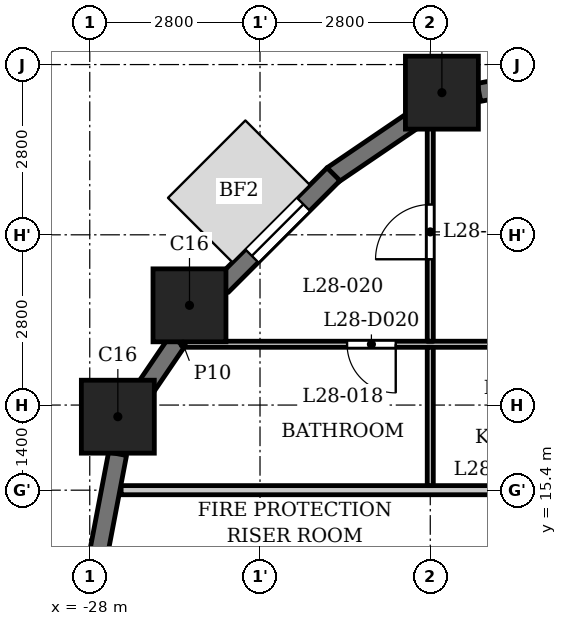
"""IFC4 building model, lengths in metres.
Left out: names, types, materials, properties, quantities, classifications, styles, units other than length and angle.
Written with IfcOpenShell. Run it as: python <this file> out.ifc"""

import sys

from ifc_helpers import new_model, si_unit, direction, frame, frame_2d, origin, origin_2d, place, context, subcontext, project, spatial, rectangle, extrude, element, fill, save


model = new_model("IFC4")
c1 = context("Model", 3, precision=1e-05, world=origin(), true_north=direction((0.0, 1.0)))
c2 = subcontext(c1, "Body", "Model", "MODEL_VIEW")
j1 = project(units=[si_unit("LENGTHUNIT", "METRE"), si_unit("PLANEANGLEUNIT", "RADIAN")], contexts=[c1])
p1 = place(None, origin())
s1 = spatial("IfcSite", under=j1, at=p1, CompositionType="ELEMENT")
p2 = place(p1, origin())
s2 = spatial("IfcBuilding", under=s1, at=p2, CompositionType="ELEMENT")
p3 = place(p2, frame((0.0, 0.0, 111.3)))
s3 = spatial("IfcBuildingStorey", under=s2, at=p3, CompositionType="ELEMENT", Elevation=111.3)
for number, where, z_axis, x_axis in (
    (1, (-22.209, 21.938, 0.0), (0.0, 0.0, 1.0), (1.0, 0.0, 0.0)),
    (2, (-26.36, 18.44, 0.0), (0.0, 0.0, 1.0), (1.0, 0.0, 0.0)),
    (3, (-27.538, 16.609, 0.0), (0.0, 0.0, 1.0), (1.0, 0.0, 0.0)),
):
    element("IfcColumn", number, at=place(p3, frame(where, z_axis=z_axis, x_axis=x_axis)), inside=s3, PredefinedType="COLUMN", context=c2, shape_type="SweptSolid", body=[
        extrude(rectangle(XDim=1.2, YDim=1.2, at=origin_2d()), origin(), (0.0, 0.0, 1.0), 3.5),
    ])
for number, where, z_axis, x_axis in (
    (4, (-19.972, 22.253, 0.0), (0.0, 0.0, 1.0), (-0.982, -0.187, 0.0)),
    (5, (-22.643, 21.51, 0.0), (0.0, 0.0, 1.0), (-0.827, -0.562, 0.0)),
):
    element("IfcWall", number, at=place(p3, frame(where, z_axis=z_axis, x_axis=x_axis)), inside=s3, PredefinedType="SOLIDWALL", context=c2, shape_type="SweptSolid", body=[
        extrude(rectangle(XDim=1.656, YDim=0.3, at=frame_2d((0.828, 0.0))), origin(), (0.0, 0.0, 1.0), 2.4),
    ])
p4 = place(p3, frame((-23.991, 20.597, 0.0), z_axis=(0.0, 0.0, 1.0), x_axis=(-0.707106781187, -0.707106781187, 0.0)))
e6 = element("IfcWall", 6, at=p4, inside=s3, PredefinedType="SOLIDWALL", context=c2, shape_type="SweptSolid", body=[
    extrude(rectangle(XDim=2.6, YDim=0.3, at=frame_2d((1.3, 0.0))), origin(), (0.0, 0.0, 1.0), 2.4),
])
p5 = place(p4, frame((0.7, 0.0, 0.6)))
e7 = element("IfcOpeningElement", 7, at=p5, cuts=e6, PredefinedType="OPENING", context=c2, shape_type="SweptSolid", body=[
    extrude(rectangle(XDim=1.2, YDim=1.55, at=frame_2d((0.6, 0.775))), frame((0.0, 0.16, 0.0), z_axis=(0.0, -1.0, 0.0), x_axis=(1.0, 0.0, 0.0)), (0.0, 0.0, 1.0), 0.32),
])
p6 = place(p3, frame((-26.561, 17.851, 0.0), z_axis=(0.0, 0.0, 1.0), x_axis=(-0.562173331661, -0.827019434577, 0.0)))
e8 = element("IfcWall", 8, at=p6, inside=s3, PredefinedType="SOLIDWALL", context=c2, shape_type="SweptSolid", body=[
    extrude(rectangle(XDim=0.977, YDim=0.3, at=frame_2d((0.489, 0.0))), origin(), (0.0, 0.0, 1.0), 3.2),
])
p7 = place(p3, frame((-27.542, 15.999, 0.0), z_axis=(0.0, 0.0, 1.0), x_axis=(-0.187349172861, -0.982293381546, 0.0)))
e9 = element("IfcWall", 9, at=p7, inside=s3, PredefinedType="SOLIDWALL", context=c2, shape_type="SweptSolid", body=[
    extrude(rectangle(XDim=1.656, YDim=0.3, at=frame_2d((0.828, 0.0))), origin(), (0.0, 0.0, 1.0), 2.4),
])
p8 = place(p3, frame((-27.484, 15.4, 0.0), z_axis=(0.0, 0.0, 1.0), x_axis=(1.0, 0.0, 0.0)))
e10 = element("IfcWall", 10, at=p8, inside=s3, PredefinedType="PARTITIONING", context=c2, shape_type="SweptSolid", body=[
    extrude(rectangle(XDim=54.968, YDim=0.15, at=frame_2d((27.484, 0.0))), origin(), (0.0, 0.0, 1.0), 3.2),
])
p9 = place(p8, frame((9.034, 0.0, 0.0)))
e11 = element("IfcOpeningElement", 11, at=p9, cuts=e10, PredefinedType="OPENING", context=c2, shape_type="SweptSolid", body=[
    extrude(rectangle(XDim=1.0, YDim=2.1, at=frame_2d((0.5, 1.05))), frame((0.0, 0.085, 0.0), z_axis=(0.0, -1.0, 0.0), x_axis=(1.0, 0.0, 0.0)), (0.0, 0.0, 1.0), 0.17),
])
p10 = place(p8, frame((14.634, 0.0, 0.0)))
e12 = element("IfcOpeningElement", 12, at=p10, cuts=e10, PredefinedType="OPENING", context=c2, shape_type="SweptSolid", body=[
    extrude(rectangle(XDim=1.0, YDim=2.1, at=frame_2d((0.5, 1.05))), frame((0.0, 0.085, 0.0), z_axis=(0.0, -1.0, 0.0), x_axis=(1.0, 0.0, 0.0)), (0.0, 0.0, 1.0), 0.17),
])
p11 = place(p8, frame((16.984, 0.0, 0.0)))
e13 = element("IfcOpeningElement", 13, at=p11, cuts=e10, PredefinedType="OPENING", context=c2, shape_type="SweptSolid", body=[
    extrude(rectangle(XDim=1.0, YDim=2.1, at=frame_2d((0.5, 1.05))), frame((0.0, 0.085, 0.0), z_axis=(0.0, -1.0, 0.0), x_axis=(1.0, 0.0, 0.0)), (0.0, 0.0, 1.0), 0.17),
])
p12 = place(p8, frame((28.084, 0.0, 0.0)))
e14 = element("IfcOpeningElement", 14, at=p12, cuts=e10, PredefinedType="OPENING", context=c2, shape_type="SweptSolid", body=[
    extrude(rectangle(XDim=1.0, YDim=2.1, at=frame_2d((0.5, 1.05))), frame((0.0, 0.085, 0.0), z_axis=(0.0, -1.0, 0.0), x_axis=(1.0, 0.0, 0.0)), (0.0, 0.0, 1.0), 0.17),
])
p13 = place(p8, frame((34.834, 0.0, 0.0)))
e15 = element("IfcOpeningElement", 15, at=p13, cuts=e10, PredefinedType="OPENING", context=c2, shape_type="SweptSolid", body=[
    extrude(rectangle(XDim=1.0, YDim=2.1, at=frame_2d((0.5, 1.05))), frame((0.0, 0.085, 0.0), z_axis=(0.0, -1.0, 0.0), x_axis=(1.0, 0.0, 0.0)), (0.0, 0.0, 1.0), 0.17),
])
p14 = place(p8, frame((41.884, 0.0, 0.0)))
e16 = element("IfcOpeningElement", 16, at=p14, cuts=e10, PredefinedType="OPENING", context=c2, shape_type="SweptSolid", body=[
    extrude(rectangle(XDim=1.0, YDim=2.1, at=frame_2d((0.5, 1.05))), frame((0.0, 0.085, 0.0), z_axis=(0.0, -1.0, 0.0), x_axis=(1.0, 0.0, 0.0)), (0.0, 0.0, 1.0), 0.17),
])
p15 = place(p8, frame((48.234, 0.0, 0.0)))
e17 = element("IfcOpeningElement", 17, at=p15, cuts=e10, PredefinedType="OPENING", context=c2, shape_type="SweptSolid", body=[
    extrude(rectangle(XDim=1.0, YDim=2.1, at=frame_2d((0.5, 1.05))), frame((0.0, 0.085, 0.0), z_axis=(0.0, -1.0, 0.0), x_axis=(1.0, 0.0, 0.0)), (0.0, 0.0, 1.0), 0.17),
])
p16 = place(p3, frame((-26.465, 17.8, 0.0), z_axis=(0.0, 0.0, 1.0), x_axis=(1.0, 0.0, 0.0)))
e18 = element("IfcWall", 18, at=p16, inside=s3, PredefinedType="PARTITIONING", context=c2, shape_type="SweptSolid", body=[
    extrude(rectangle(XDim=52.859, YDim=0.1, at=frame_2d((26.43, 0.0))), origin(), (0.0, 0.0, 1.0), 3.2),
])
p17 = place(p16, frame((2.697, 0.0, 0.0)))
e19 = element("IfcOpeningElement", 19, at=p17, cuts=e18, PredefinedType="OPENING", context=c2, shape_type="SweptSolid", body=[
    extrude(rectangle(XDim=0.8, YDim=2.1, at=frame_2d((0.4, 1.05))), frame((0.0, 0.06, 0.0), z_axis=(0.0, -1.0, 0.0), x_axis=(1.0, 0.0, 0.0)), (0.0, 0.0, 1.0), 0.12),
])
p18 = place(p16, frame((7.115, 0.0, 0.0)))
e20 = element("IfcOpeningElement", 20, at=p18, cuts=e18, PredefinedType="OPENING", context=c2, shape_type="SweptSolid", body=[
    extrude(rectangle(XDim=0.9, YDim=2.1, at=frame_2d((0.45, 1.05))), frame((0.0, 0.06, 0.0), z_axis=(0.0, -1.0, 0.0), x_axis=(1.0, 0.0, 0.0)), (0.0, 0.0, 1.0), 0.12),
])
p19 = place(p16, frame((10.315, 0.0, 0.0)))
e21 = element("IfcOpeningElement", 21, at=p19, cuts=e18, PredefinedType="OPENING", context=c2, shape_type="SweptSolid", body=[
    extrude(rectangle(XDim=0.8, YDim=2.1, at=frame_2d((0.4, 1.05))), frame((0.0, 0.06, 0.0), z_axis=(0.0, -1.0, 0.0), x_axis=(1.0, 0.0, 0.0)), (0.0, 0.0, 1.0), 0.12),
])
p20 = place(p16, frame((12.715, 0.0, 0.0)))
e22 = element("IfcOpeningElement", 22, at=p20, cuts=e18, PredefinedType="OPENING", context=c2, shape_type="SweptSolid", body=[
    extrude(rectangle(XDim=0.9, YDim=2.1, at=frame_2d((0.45, 1.05))), frame((0.0, 0.06, 0.0), z_axis=(0.0, -1.0, 0.0), x_axis=(1.0, 0.0, 0.0)), (0.0, 0.0, 1.0), 0.12),
])
p21 = place(p16, frame((21.515, 0.0, 0.0)))
e23 = element("IfcOpeningElement", 23, at=p21, cuts=e18, PredefinedType="OPENING", context=c2, shape_type="SweptSolid", body=[
    extrude(rectangle(XDim=0.8, YDim=2.1, at=frame_2d((0.4, 1.05))), frame((0.0, 0.06, 0.0), z_axis=(0.0, -1.0, 0.0), x_axis=(1.0, 0.0, 0.0)), (0.0, 0.0, 1.0), 0.12),
])
p22 = place(p16, frame((17.065, 0.0, 0.0)))
e24 = element("IfcOpeningElement", 24, at=p22, cuts=e18, PredefinedType="OPENING", context=c2, shape_type="SweptSolid", body=[
    extrude(rectangle(XDim=0.9, YDim=2.1, at=frame_2d((0.45, 1.05))), frame((0.0, 0.06, 0.0), z_axis=(0.0, -1.0, 0.0), x_axis=(1.0, 0.0, 0.0)), (0.0, 0.0, 1.0), 0.12),
])
p23 = place(p16, frame((30.365, 0.0, 0.0)))
e25 = element("IfcOpeningElement", 25, at=p23, cuts=e18, PredefinedType="OPENING", context=c2, shape_type="SweptSolid", body=[
    extrude(rectangle(XDim=0.8, YDim=2.1, at=frame_2d((0.4, 1.05))), frame((0.0, 0.06, 0.0), z_axis=(0.0, -1.0, 0.0), x_axis=(1.0, 0.0, 0.0)), (0.0, 0.0, 1.0), 0.12),
])
p24 = place(p16, frame((28.165, 0.0, 0.0)))
e26 = element("IfcOpeningElement", 26, at=p24, cuts=e18, PredefinedType="OPENING", context=c2, shape_type="SweptSolid", body=[
    extrude(rectangle(XDim=0.9, YDim=2.1, at=frame_2d((0.45, 1.05))), frame((0.0, 0.06, 0.0), z_axis=(0.0, -1.0, 0.0), x_axis=(1.0, 0.0, 0.0)), (0.0, 0.0, 1.0), 0.12),
])
p25 = place(p16, frame((36.115, 0.0, 0.0)))
e27 = element("IfcOpeningElement", 27, at=p25, cuts=e18, PredefinedType="OPENING", context=c2, shape_type="SweptSolid", body=[
    extrude(rectangle(XDim=0.8, YDim=2.1, at=frame_2d((0.4, 1.05))), frame((0.0, 0.06, 0.0), z_axis=(0.0, -1.0, 0.0), x_axis=(1.0, 0.0, 0.0)), (0.0, 0.0, 1.0), 0.12),
])
p26 = place(p16, frame((32.915, 0.0, 0.0)))
e28 = element("IfcOpeningElement", 28, at=p26, cuts=e18, PredefinedType="OPENING", context=c2, shape_type="SweptSolid", body=[
    extrude(rectangle(XDim=0.9, YDim=2.1, at=frame_2d((0.45, 1.05))), frame((0.0, 0.06, 0.0), z_axis=(0.0, -1.0, 0.0), x_axis=(1.0, 0.0, 0.0)), (0.0, 0.0, 1.0), 0.12),
])
p27 = place(p16, frame((38.315, 0.0, 0.0)))
e29 = element("IfcOpeningElement", 29, at=p27, cuts=e18, PredefinedType="OPENING", context=c2, shape_type="SweptSolid", body=[
    extrude(rectangle(XDim=0.8, YDim=2.1, at=frame_2d((0.4, 1.05))), frame((0.0, 0.06, 0.0), z_axis=(0.0, -1.0, 0.0), x_axis=(1.0, 0.0, 0.0)), (0.0, 0.0, 1.0), 0.12),
])
p28 = place(p16, frame((40.965, 0.0, 0.0)))
e30 = element("IfcOpeningElement", 30, at=p28, cuts=e18, PredefinedType="OPENING", context=c2, shape_type="SweptSolid", body=[
    extrude(rectangle(XDim=0.9, YDim=2.1, at=frame_2d((0.45, 1.05))), frame((0.0, 0.06, 0.0), z_axis=(0.0, -1.0, 0.0), x_axis=(1.0, 0.0, 0.0)), (0.0, 0.0, 1.0), 0.12),
])
p29 = place(p16, frame((51.265, 0.0, 0.0)))
e31 = element("IfcOpeningElement", 31, at=p29, cuts=e18, PredefinedType="OPENING", context=c2, shape_type="SweptSolid", body=[
    extrude(rectangle(XDim=0.8, YDim=2.1, at=frame_2d((0.4, 1.05))), frame((0.0, 0.06, 0.0), z_axis=(0.0, -1.0, 0.0), x_axis=(1.0, 0.0, 0.0)), (0.0, 0.0, 1.0), 0.12),
])
p30 = place(p16, frame((46.315, 0.0, 0.0)))
e32 = element("IfcOpeningElement", 32, at=p30, cuts=e18, PredefinedType="OPENING", context=c2, shape_type="SweptSolid", body=[
    extrude(rectangle(XDim=0.9, YDim=2.1, at=frame_2d((0.45, 1.05))), frame((0.0, 0.06, 0.0), z_axis=(0.0, -1.0, 0.0), x_axis=(1.0, 0.0, 0.0)), (0.0, 0.0, 1.0), 0.12),
])
p31 = place(p3, frame((-22.4, 15.475, 0.0), z_axis=(0.0, 0.0, 1.0), x_axis=(0.0, 1.0, 0.0)))
e33 = element("IfcWall", 33, at=p31, inside=s3, PredefinedType="PARTITIONING", context=c2, shape_type="SweptSolid", body=[
    extrude(rectangle(XDim=2.275, YDim=0.1, at=frame_2d((1.137, 0.0))), origin(), (0.0, 0.0, 1.0), 3.2),
])
p32 = place(p3, frame((-22.4, 17.85, 0.0), z_axis=(0.0, 0.0, 1.0), x_axis=(0.0, 1.0, 0.0)))
e34 = element("IfcWall", 34, at=p32, inside=s3, PredefinedType="PARTITIONING", context=c2, shape_type="SweptSolid", body=[
    extrude(rectangle(XDim=3.87, YDim=0.1, at=frame_2d((1.935, 0.0))), origin(), (0.0, 0.0, 1.0), 3.2),
])
p33 = place(p32, frame((1.348, 0.0, 0.0)))
e35 = element("IfcOpeningElement", 35, at=p33, cuts=e34, PredefinedType="OPENING", context=c2, shape_type="SweptSolid", body=[
    extrude(rectangle(XDim=0.9, YDim=2.1, at=frame_2d((0.45, 1.05))), frame((0.0, 0.06, 0.0), z_axis=(0.0, -1.0, 0.0), x_axis=(1.0, 0.0, 0.0)), (0.0, 0.0, 1.0), 0.12),
])
p34 = place(p17, origin())
e36 = element("IfcDoor", 36, at=p34, inside=s3, OperationType="SINGLE_SWING_RIGHT", PredefinedType="DOOR", context=c2, shape_type="SweptSolid", body=[
    extrude(rectangle(XDim=0.8, YDim=2.1, at=frame_2d((0.4, 1.05))), frame((0.0, 0.025, 0.0), z_axis=(0.0, -1.0, 0.0), x_axis=(1.0, 0.0, 0.0)), (0.0, 0.0, 1.0), 0.05),
])
fill(e19, e36)
p35 = place(p33, origin())
e37 = element("IfcDoor", 37, at=p35, inside=s3, OperationType="SINGLE_SWING_RIGHT", PredefinedType="DOOR", context=c2, shape_type="SweptSolid", body=[
    extrude(rectangle(XDim=0.9, YDim=2.1, at=frame_2d((0.45, 1.05))), frame((0.0, 0.025, 0.0), z_axis=(0.0, -1.0, 0.0), x_axis=(1.0, 0.0, 0.0)), (0.0, 0.0, 1.0), 0.05),
])
fill(e35, e37)
p36 = place(p5, origin())
e38 = element("IfcWindow", 38, at=p36, inside=s3, PartitioningType="SINGLE_PANEL", PredefinedType="WINDOW", context=c2, shape_type="SweptSolid", body=[
    extrude(rectangle(XDim=1.2, YDim=1.55, at=frame_2d((0.6, 0.775))), frame((0.0, 0.03, 0.0), z_axis=(0.0, -1.0, 0.0), x_axis=(1.0, 0.0, 0.0)), (0.0, 0.0, 1.0), 0.06),
])
fill(e7, e38)
save(model, sys.argv[1])
